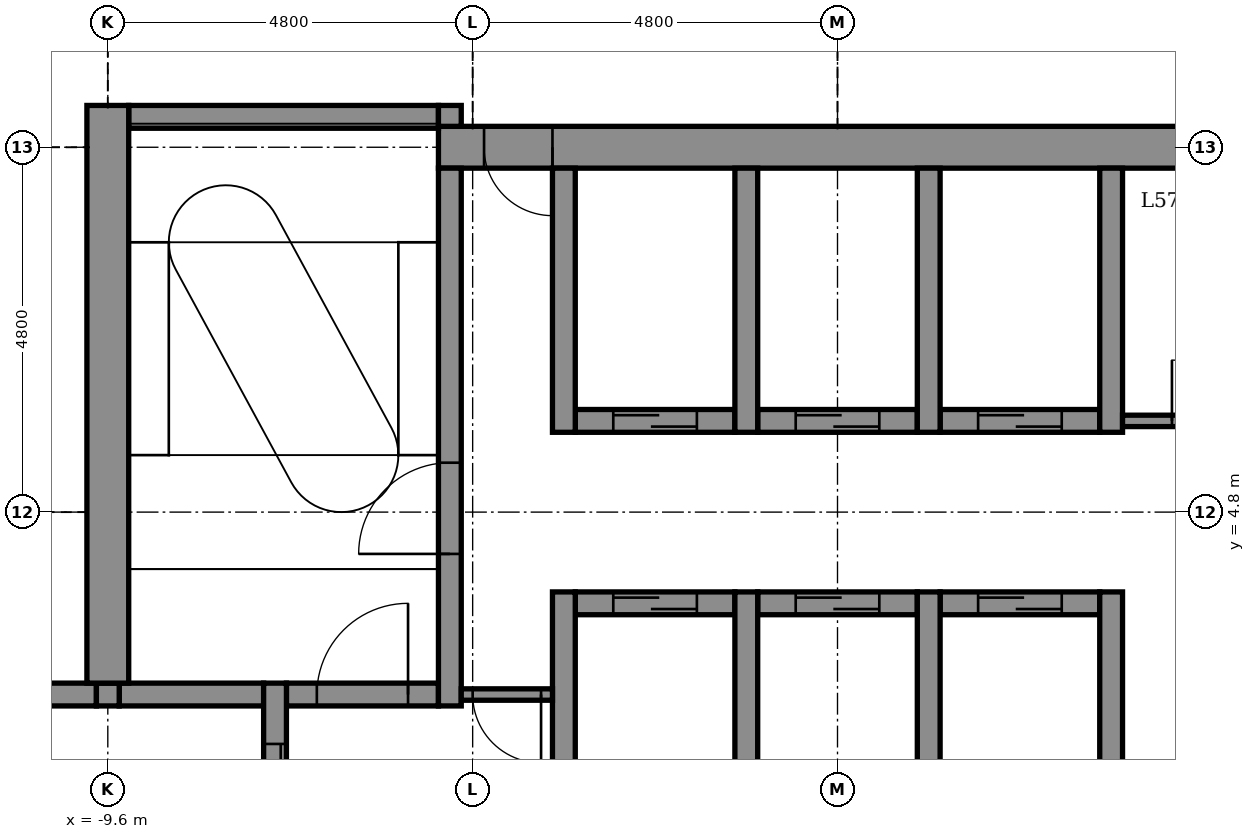
"""IFC4 building model, lengths in metres.
Left out: names, types, materials, properties, quantities, classifications, styles, units other than length and angle.
Written with IfcOpenShell. Run it as: python <this file> out.ifc"""

import sys

from ifc_helpers import new_model, si_unit, direction, frame, frame_2d, origin, place, context, subcontext, project, spatial, rectangle, extrude, element, fill, save


model = new_model("IFC4")
c1 = context("Model", 3, precision=1e-05, world=origin(), true_north=direction((0.0, 1.0)))
c2 = subcontext(c1, "Body", "Model", "MODEL_VIEW")
j1 = project(units=[si_unit("LENGTHUNIT", "METRE"), si_unit("PLANEANGLEUNIT", "RADIAN")], contexts=[c1])
p1 = place(None, origin())
s1 = spatial("IfcSite", under=j1, at=p1, CompositionType="ELEMENT")
p2 = place(p1, origin())
s2 = spatial("IfcBuilding", under=s1, at=p2, CompositionType="ELEMENT")
p3 = place(p2, frame((0.0, 0.0, 257.9)))
s3 = spatial("IfcBuildingStorey", under=s2, at=p3, CompositionType="ELEMENT", Elevation=257.9)
p4 = place(p3, frame((-10.85, 2.4, -0.15), z_axis=(0.0, 0.0, 1.0), x_axis=(1.0, 0.0, 0.0)))
e1 = element("IfcWall", 1, at=p4, inside=s3, PredefinedType="STANDARD", context=c2, shape_type="SweptSolid", body=[
    extrude(rectangle(XDim=1.1, YDim=0.3, at=frame_2d((0.55, 0.0))), origin(), (0.0, 0.0, 1.0), 3.9),
])
p5 = place(p3, frame((-9.45, 2.4, -0.15), z_axis=(0.0, 0.0, 1.0), x_axis=(1.0, 0.0, 0.0)))
e2 = element("IfcWall", 2, at=p5, inside=s3, PredefinedType="STANDARD", context=c2, shape_type="SweptSolid", body=[
    extrude(rectangle(XDim=1.9, YDim=0.3, at=frame_2d((0.95, 0.0))), origin(), (0.0, 0.0, 1.0), 3.9),
])
p6 = place(p3, frame((-7.25, 2.4, -0.15), z_axis=(0.0, 0.0, 1.0), x_axis=(1.0, 0.0, 0.0)))
e3 = element("IfcWall", 3, at=p6, inside=s3, PredefinedType="STANDARD", context=c2, shape_type="SweptSolid", body=[
    extrude(rectangle(XDim=2.0, YDim=0.3, at=frame_2d((1.0, 0.0))), origin(), (0.0, 0.0, 1.0), 3.9),
])
p7 = place(p6, frame((0.4, 0.0, 0.15)))
e4 = element("IfcOpeningElement", 4, at=p7, cuts=e3, PredefinedType="OPENING", context=c2, shape_type="SweptSolid", body=[
    extrude(rectangle(XDim=1.2, YDim=2.1, at=frame_2d((0.6, 1.05))), frame((0.0, 0.16, 0.0), z_axis=(0.0, -1.0, 0.0), x_axis=(1.0, 0.0, 0.0)), (0.0, 0.0, 1.0), 0.32),
])
p8 = place(p3, frame((-3.45, 3.6, -0.15), z_axis=(0.0, 0.0, 1.0), x_axis=(1.0, 0.0, 0.0)))
e5 = element("IfcWall", 5, at=p8, inside=s3, PredefinedType="STANDARD", context=c2, shape_type="SweptSolid", body=[
    extrude(rectangle(XDim=2.1, YDim=0.3, at=frame_2d((1.05, 0.0))), origin(), (0.0, 0.0, 1.0), 3.9),
])
p9 = place(p8, frame((0.5, 0.0, 0.15)))
e6 = element("IfcOpeningElement", 6, at=p9, cuts=e5, PredefinedType="OPENING", context=c2, shape_type="SweptSolid", body=[
    extrude(rectangle(XDim=1.1, YDim=2.1, at=frame_2d((0.55, 1.05))), frame((0.0, 0.16, 0.0), z_axis=(0.0, -1.0, 0.0), x_axis=(1.0, 0.0, 0.0)), (0.0, 0.0, 1.0), 0.32),
])
p10 = place(p3, frame((-1.05, 3.6, -0.15), z_axis=(0.0, 0.0, 1.0), x_axis=(1.0, 0.0, 0.0)))
e7 = element("IfcWall", 7, at=p10, inside=s3, PredefinedType="STANDARD", context=c2, shape_type="SweptSolid", body=[
    extrude(rectangle(XDim=2.1, YDim=0.3, at=frame_2d((1.05, 0.0))), origin(), (0.0, 0.0, 1.0), 3.9),
])
p11 = place(p10, frame((0.5, 0.0, 0.15)))
e8 = element("IfcOpeningElement", 8, at=p11, cuts=e7, PredefinedType="OPENING", context=c2, shape_type="SweptSolid", body=[
    extrude(rectangle(XDim=1.1, YDim=2.1, at=frame_2d((0.55, 1.05))), frame((0.0, 0.16, 0.0), z_axis=(0.0, -1.0, 0.0), x_axis=(1.0, 0.0, 0.0)), (0.0, 0.0, 1.0), 0.32),
])
p12 = place(p3, frame((1.35, 3.6, -0.15), z_axis=(0.0, 0.0, 1.0), x_axis=(1.0, 0.0, 0.0)))
e9 = element("IfcWall", 9, at=p12, inside=s3, PredefinedType="STANDARD", context=c2, shape_type="SweptSolid", body=[
    extrude(rectangle(XDim=2.1, YDim=0.3, at=frame_2d((1.05, 0.0))), origin(), (0.0, 0.0, 1.0), 3.9),
])
p13 = place(p12, frame((0.5, 0.0, 0.15)))
e10 = element("IfcOpeningElement", 10, at=p13, cuts=e9, PredefinedType="OPENING", context=c2, shape_type="SweptSolid", body=[
    extrude(rectangle(XDim=1.1, YDim=2.1, at=frame_2d((0.55, 1.05))), frame((0.0, 0.16, 0.0), z_axis=(0.0, -1.0, 0.0), x_axis=(1.0, 0.0, 0.0)), (0.0, 0.0, 1.0), 0.32),
])
p14 = place(p3, frame((-3.45, 6.0, -0.15), z_axis=(0.0, 0.0, 1.0), x_axis=(1.0, 0.0, 0.0)))
e11 = element("IfcWall", 11, at=p14, inside=s3, PredefinedType="STANDARD", context=c2, shape_type="SweptSolid", body=[
    extrude(rectangle(XDim=2.1, YDim=0.3, at=frame_2d((1.05, 0.0))), origin(), (0.0, 0.0, 1.0), 3.9),
])
p15 = place(p14, frame((0.5, 0.0, 0.15)))
e12 = element("IfcOpeningElement", 12, at=p15, cuts=e11, PredefinedType="OPENING", context=c2, shape_type="SweptSolid", body=[
    extrude(rectangle(XDim=1.1, YDim=2.1, at=frame_2d((0.55, 1.05))), frame((0.0, 0.16, 0.0), z_axis=(0.0, -1.0, 0.0), x_axis=(1.0, 0.0, 0.0)), (0.0, 0.0, 1.0), 0.32),
])
p16 = place(p3, frame((-1.05, 6.0, -0.15), z_axis=(0.0, 0.0, 1.0), x_axis=(1.0, 0.0, 0.0)))
e13 = element("IfcWall", 13, at=p16, inside=s3, PredefinedType="STANDARD", context=c2, shape_type="SweptSolid", body=[
    extrude(rectangle(XDim=2.1, YDim=0.3, at=frame_2d((1.05, 0.0))), origin(), (0.0, 0.0, 1.0), 3.9),
])
p17 = place(p16, frame((0.5, 0.0, 0.15)))
e14 = element("IfcOpeningElement", 14, at=p17, cuts=e13, PredefinedType="OPENING", context=c2, shape_type="SweptSolid", body=[
    extrude(rectangle(XDim=1.1, YDim=2.1, at=frame_2d((0.55, 1.05))), frame((0.0, 0.16, 0.0), z_axis=(0.0, -1.0, 0.0), x_axis=(1.0, 0.0, 0.0)), (0.0, 0.0, 1.0), 0.32),
])
p18 = place(p3, frame((1.35, 6.0, -0.15), z_axis=(0.0, 0.0, 1.0), x_axis=(1.0, 0.0, 0.0)))
e15 = element("IfcWall", 15, at=p18, inside=s3, PredefinedType="STANDARD", context=c2, shape_type="SweptSolid", body=[
    extrude(rectangle(XDim=2.1, YDim=0.3, at=frame_2d((1.05, 0.0))), origin(), (0.0, 0.0, 1.0), 3.9),
])
p19 = place(p18, frame((0.5, 0.0, 0.15)))
e16 = element("IfcOpeningElement", 16, at=p19, cuts=e15, PredefinedType="OPENING", context=c2, shape_type="SweptSolid", body=[
    extrude(rectangle(XDim=1.1, YDim=2.1, at=frame_2d((0.55, 1.05))), frame((0.0, 0.16, 0.0), z_axis=(0.0, -1.0, 0.0), x_axis=(1.0, 0.0, 0.0)), (0.0, 0.0, 1.0), 0.32),
])
p20 = place(p3, frame((-5.25, 9.6, -0.15), z_axis=(0.0, 0.0, 1.0), x_axis=(1.0, 0.0, 0.0)))
e17 = element("IfcWall", 17, at=p20, inside=s3, PredefinedType="SHEAR", context=c2, shape_type="SweptSolid", body=[
    extrude(rectangle(XDim=14.575, YDim=0.55, at=frame_2d((7.288, 0.0))), origin(), (0.0, 0.0, 1.0), 3.9),
])
p21 = place(p20, frame((0.6, 0.0, 0.15)))
e18 = element("IfcOpeningElement", 18, at=p21, cuts=e17, PredefinedType="OPENING", context=c2, shape_type="SweptSolid", body=[
    extrude(rectangle(XDim=0.9, YDim=2.1, at=frame_2d((0.45, 1.05))), frame((0.0, 0.285, 0.0), z_axis=(0.0, -1.0, 0.0), x_axis=(1.0, 0.0, 0.0)), (0.0, 0.0, 1.0), 0.57),
])
p22 = place(p3, frame((-9.325, 10.0, -0.15), z_axis=(0.0, 0.0, 1.0), x_axis=(1.0, 0.0, 0.0)))
e19 = element("IfcWall", 19, at=p22, inside=s3, PredefinedType="STANDARD", context=c2, shape_type="SweptSolid", body=[
    extrude(rectangle(XDim=4.075, YDim=0.3, at=frame_2d((2.038, 0.0))), origin(), (0.0, 0.0, 1.0), 3.9),
])
p23 = place(p3, frame((-9.6, 2.25, -0.15), z_axis=(0.0, 0.0, 1.0), x_axis=(0.0, 1.0, 0.0)))
e20 = element("IfcWall", 20, at=p23, inside=s3, PredefinedType="STANDARD", context=c2, shape_type="SweptSolid", body=[
    extrude(rectangle(XDim=0.3, YDim=0.3, at=frame_2d((0.15, 0.0))), origin(), (0.0, 0.0, 1.0), 3.9),
])
p24 = place(p3, frame((-9.6, 2.55, -0.15), z_axis=(0.0, 0.0, 1.0), x_axis=(0.0, 1.0, 0.0)))
e21 = element("IfcWall", 21, at=p24, inside=s3, PredefinedType="SHEAR", context=c2, shape_type="SweptSolid", body=[
    extrude(rectangle(XDim=7.6, YDim=0.55, at=frame_2d((3.8, 0.0))), origin(), (0.0, 0.0, 1.0), 3.9),
])
p25 = place(p3, frame((-7.4, -2.55, -0.15), z_axis=(0.0, 0.0, 1.0), x_axis=(0.0, 1.0, 0.0)))
e22 = element("IfcWall", 22, at=p25, inside=s3, PredefinedType="STANDARD", context=c2, shape_type="SweptSolid", body=[
    extrude(rectangle(XDim=5.1, YDim=0.3, at=frame_2d((2.55, 0.0))), origin(), (0.0, 0.0, 1.0), 3.9),
])
p26 = place(p25, frame((0.8, 0.0, 0.15)))
e23 = element("IfcOpeningElement", 23, at=p26, cuts=e22, PredefinedType="OPENING", context=c2, shape_type="SweptSolid", body=[
    extrude(rectangle(XDim=1.1, YDim=2.1, at=frame_2d((0.55, 1.05))), frame((0.0, 0.16, 0.0), z_axis=(0.0, -1.0, 0.0), x_axis=(1.0, 0.0, 0.0)), (0.0, 0.0, 1.0), 0.32),
])
p27 = place(p25, frame((3.2, 0.0, 0.15)))
e24 = element("IfcOpeningElement", 24, at=p27, cuts=e22, PredefinedType="OPENING", context=c2, shape_type="SweptSolid", body=[
    extrude(rectangle(XDim=1.1, YDim=2.1, at=frame_2d((0.55, 1.05))), frame((0.0, 0.16, 0.0), z_axis=(0.0, -1.0, 0.0), x_axis=(1.0, 0.0, 0.0)), (0.0, 0.0, 1.0), 0.32),
])
p28 = place(p3, frame((-5.1, 2.25, -0.15), z_axis=(0.0, 0.0, 1.0), x_axis=(0.0, 1.0, 0.0)))
e25 = element("IfcWall", 25, at=p28, inside=s3, PredefinedType="STANDARD", context=c2, shape_type="SweptSolid", body=[
    extrude(rectangle(XDim=7.075, YDim=0.3, at=frame_2d((3.538, 0.0))), origin(), (0.0, 0.0, 1.0), 3.9),
])
p29 = place(p28, frame((2.0, 0.0, 0.15)))
e26 = element("IfcOpeningElement", 26, at=p29, cuts=e25, PredefinedType="OPENING", context=c2, shape_type="SweptSolid", body=[
    extrude(rectangle(XDim=1.2, YDim=2.1, at=frame_2d((0.6, 1.05))), frame((0.0, 0.16, 0.0), z_axis=(0.0, -1.0, 0.0), x_axis=(1.0, 0.0, 0.0)), (0.0, 0.0, 1.0), 0.32),
])
p30 = place(p3, frame((-5.1, 9.875, -0.15), z_axis=(0.0, 0.0, 1.0), x_axis=(0.0, 1.0, 0.0)))
e27 = element("IfcWall", 27, at=p30, inside=s3, PredefinedType="STANDARD", context=c2, shape_type="SweptSolid", body=[
    extrude(rectangle(XDim=0.275, YDim=0.3, at=frame_2d((0.137, 0.0))), origin(), (0.0, 0.0, 1.0), 3.9),
])
p31 = place(p3, frame((-3.6, -3.75, -0.15), z_axis=(0.0, 0.0, 1.0), x_axis=(0.0, 1.0, 0.0)))
e28 = element("IfcWall", 28, at=p31, inside=s3, PredefinedType="STANDARD", context=c2, shape_type="SweptSolid", body=[
    extrude(rectangle(XDim=7.5, YDim=0.3, at=frame_2d((3.75, 0.0))), origin(), (0.0, 0.0, 1.0), 3.9),
])
p32 = place(p3, frame((-3.6, 5.85, -0.15), z_axis=(0.0, 0.0, 1.0), x_axis=(0.0, 1.0, 0.0)))
e29 = element("IfcWall", 29, at=p32, inside=s3, PredefinedType="STANDARD", context=c2, shape_type="SweptSolid", body=[
    extrude(rectangle(XDim=3.475, YDim=0.3, at=frame_2d((1.737, 0.0))), origin(), (0.0, 0.0, 1.0), 3.9),
])
p33 = place(p3, frame((-1.2, -3.75, -0.15), z_axis=(0.0, 0.0, 1.0), x_axis=(0.0, 1.0, 0.0)))
e30 = element("IfcWall", 30, at=p33, inside=s3, PredefinedType="STANDARD", context=c2, shape_type="SweptSolid", body=[
    extrude(rectangle(XDim=7.5, YDim=0.3, at=frame_2d((3.75, 0.0))), origin(), (0.0, 0.0, 1.0), 3.9),
])
p34 = place(p3, frame((-1.2, 5.85, -0.15), z_axis=(0.0, 0.0, 1.0), x_axis=(0.0, 1.0, 0.0)))
e31 = element("IfcWall", 31, at=p34, inside=s3, PredefinedType="STANDARD", context=c2, shape_type="SweptSolid", body=[
    extrude(rectangle(XDim=3.475, YDim=0.3, at=frame_2d((1.737, 0.0))), origin(), (0.0, 0.0, 1.0), 3.9),
])
p35 = place(p3, frame((1.2, -3.75, -0.15), z_axis=(0.0, 0.0, 1.0), x_axis=(0.0, 1.0, 0.0)))
e32 = element("IfcWall", 32, at=p35, inside=s3, PredefinedType="STANDARD", context=c2, shape_type="SweptSolid", body=[
    extrude(rectangle(XDim=7.5, YDim=0.3, at=frame_2d((3.75, 0.0))), origin(), (0.0, 0.0, 1.0), 3.9),
])
p36 = place(p3, frame((1.2, 5.85, -0.15), z_axis=(0.0, 0.0, 1.0), x_axis=(0.0, 1.0, 0.0)))
e33 = element("IfcWall", 33, at=p36, inside=s3, PredefinedType="STANDARD", context=c2, shape_type="SweptSolid", body=[
    extrude(rectangle(XDim=3.475, YDim=0.3, at=frame_2d((1.737, 0.0))), origin(), (0.0, 0.0, 1.0), 3.9),
])
p37 = place(p3, frame((3.6, -3.75, -0.15), z_axis=(0.0, 0.0, 1.0), x_axis=(0.0, 1.0, 0.0)))
e34 = element("IfcWall", 34, at=p37, inside=s3, PredefinedType="STANDARD", context=c2, shape_type="SweptSolid", body=[
    extrude(rectangle(XDim=7.5, YDim=0.3, at=frame_2d((3.75, 0.0))), origin(), (0.0, 0.0, 1.0), 3.9),
])
p38 = place(p3, frame((3.6, 5.85, -0.15), z_axis=(0.0, 0.0, 1.0), x_axis=(0.0, 1.0, 0.0)))
e35 = element("IfcWall", 35, at=p38, inside=s3, PredefinedType="STANDARD", context=c2, shape_type="SweptSolid", body=[
    extrude(rectangle(XDim=3.475, YDim=0.3, at=frame_2d((1.737, 0.0))), origin(), (0.0, 0.0, 1.0), 3.9),
])
p39 = place(p3, frame((3.75, 6.0, 0.0), z_axis=(0.0, 0.0, 1.0), x_axis=(1.0, 0.0, 0.0)))
e36 = element("IfcWall", 36, at=p39, inside=s3, PredefinedType="PARTITIONING", context=c2, shape_type="SweptSolid", body=[
    extrude(rectangle(XDim=2.25, YDim=0.15, at=frame_2d((1.125, 0.0))), origin(), (0.0, 0.0, 1.0), 3.75),
])
p40 = place(p39, frame((0.65, 0.0, 0.0)))
e37 = element("IfcOpeningElement", 37, at=p40, cuts=e36, PredefinedType="OPENING", context=c2, shape_type="SweptSolid", body=[
    extrude(rectangle(XDim=0.8, YDim=2.1, at=frame_2d((0.4, 1.05))), frame((0.0, 0.085, 0.0), z_axis=(0.0, -1.0, 0.0), x_axis=(1.0, 0.0, 0.0)), (0.0, 0.0, 1.0), 0.17),
])
p41 = place(p3, frame((-4.95, 2.4, 0.0), z_axis=(0.0, 0.0, 1.0), x_axis=(1.0, 0.0, 0.0)))
e38 = element("IfcWall", 38, at=p41, inside=s3, PredefinedType="PARTITIONING", context=c2, shape_type="SweptSolid", body=[
    extrude(rectangle(XDim=1.2, YDim=0.15, at=frame_2d((0.6, 0.0))), origin(), (0.0, 0.0, 1.0), 3.75),
])
p42 = place(p41, frame((0.15, 0.0, 0.0)))
e39 = element("IfcOpeningElement", 39, at=p42, cuts=e38, PredefinedType="OPENING", context=c2, shape_type="SweptSolid", body=[
    extrude(rectangle(XDim=0.9, YDim=2.1, at=frame_2d((0.45, 1.05))), frame((0.0, 0.085, 0.0), z_axis=(0.0, -1.0, 0.0), x_axis=(1.0, 0.0, 0.0)), (0.0, 0.0, 1.0), 0.17),
])
p43 = place(p40, origin())
e40 = element("IfcDoor", 40, at=p43, inside=s3, OperationType="SINGLE_SWING_LEFT", PredefinedType="DOOR", context=c2, shape_type="SweptSolid", body=[
    extrude(rectangle(XDim=0.8, YDim=2.1, at=frame_2d((0.4, 1.05))), frame((0.0, 0.025, 0.0), z_axis=(0.0, -1.0, 0.0), x_axis=(1.0, 0.0, 0.0)), (0.0, 0.0, 1.0), 0.05),
])
fill(e37, e40)
p44 = place(p27, origin())
e41 = element("IfcDoor", 41, at=p44, inside=s3, OperationType="DOUBLE_DOOR_SLIDING", PredefinedType="DOOR", context=c2, shape_type="SweptSolid", body=[
    extrude(rectangle(XDim=1.1, YDim=2.1, at=frame_2d((0.55, 1.05))), frame((0.0, 0.025, 0.0), z_axis=(0.0, -1.0, 0.0), x_axis=(1.0, 0.0, 0.0)), (0.0, 0.0, 1.0), 0.05),
])
fill(e24, e41)
p45 = place(p15, origin())
e42 = element("IfcDoor", 42, at=p45, inside=s3, OperationType="DOUBLE_DOOR_SLIDING", PredefinedType="DOOR", context=c2, shape_type="SweptSolid", body=[
    extrude(rectangle(XDim=1.1, YDim=2.1, at=frame_2d((0.55, 1.05))), frame((0.0, 0.025, 0.0), z_axis=(0.0, -1.0, 0.0), x_axis=(1.0, 0.0, 0.0)), (0.0, 0.0, 1.0), 0.05),
])
fill(e12, e42)
p46 = place(p17, origin())
e43 = element("IfcDoor", 43, at=p46, inside=s3, OperationType="DOUBLE_DOOR_SLIDING", PredefinedType="DOOR", context=c2, shape_type="SweptSolid", body=[
    extrude(rectangle(XDim=1.1, YDim=2.1, at=frame_2d((0.55, 1.05))), frame((0.0, 0.025, 0.0), z_axis=(0.0, -1.0, 0.0), x_axis=(1.0, 0.0, 0.0)), (0.0, 0.0, 1.0), 0.05),
])
fill(e14, e43)
p47 = place(p19, origin())
e44 = element("IfcDoor", 44, at=p47, inside=s3, OperationType="DOUBLE_DOOR_SLIDING", PredefinedType="DOOR", context=c2, shape_type="SweptSolid", body=[
    extrude(rectangle(XDim=1.1, YDim=2.1, at=frame_2d((0.55, 1.05))), frame((0.0, 0.025, 0.0), z_axis=(0.0, -1.0, 0.0), x_axis=(1.0, 0.0, 0.0)), (0.0, 0.0, 1.0), 0.05),
])
fill(e16, e44)
p48 = place(p9, origin())
e45 = element("IfcDoor", 45, at=p48, inside=s3, OperationType="DOUBLE_DOOR_SLIDING", PredefinedType="DOOR", context=c2, shape_type="SweptSolid", body=[
    extrude(rectangle(XDim=1.1, YDim=2.1, at=frame_2d((0.55, 1.05))), frame((0.0, 0.025, 0.0), z_axis=(0.0, -1.0, 0.0), x_axis=(1.0, 0.0, 0.0)), (0.0, 0.0, 1.0), 0.05),
])
fill(e6, e45)
p49 = place(p11, origin())
e46 = element("IfcDoor", 46, at=p49, inside=s3, OperationType="DOUBLE_DOOR_SLIDING", PredefinedType="DOOR", context=c2, shape_type="SweptSolid", body=[
    extrude(rectangle(XDim=1.1, YDim=2.1, at=frame_2d((0.55, 1.05))), frame((0.0, 0.025, 0.0), z_axis=(0.0, -1.0, 0.0), x_axis=(1.0, 0.0, 0.0)), (0.0, 0.0, 1.0), 0.05),
])
fill(e8, e46)
p50 = place(p13, origin())
e47 = element("IfcDoor", 47, at=p50, inside=s3, OperationType="DOUBLE_DOOR_SLIDING", PredefinedType="DOOR", context=c2, shape_type="SweptSolid", body=[
    extrude(rectangle(XDim=1.1, YDim=2.1, at=frame_2d((0.55, 1.05))), frame((0.0, 0.025, 0.0), z_axis=(0.0, -1.0, 0.0), x_axis=(1.0, 0.0, 0.0)), (0.0, 0.0, 1.0), 0.05),
])
fill(e10, e47)
p51 = place(p29, origin())
e48 = element("IfcDoor", 48, at=p51, inside=s3, OperationType="SINGLE_SWING_LEFT", PredefinedType="DOOR", context=c2, shape_type="SweptSolid", body=[
    extrude(rectangle(XDim=1.2, YDim=2.1, at=frame_2d((0.6, 1.05))), frame((0.0, 0.025, 0.0), z_axis=(0.0, -1.0, 0.0), x_axis=(1.0, 0.0, 0.0)), (0.0, 0.0, 1.0), 0.05),
])
fill(e26, e48)
p52 = place(p21, frame((0.9, 0.0, 0.0), z_axis=(0.0, 0.0, 1.0), x_axis=(-1.0, 0.0, 0.0)))
e49 = element("IfcDoor", 49, at=p52, inside=s3, OperationType="SINGLE_SWING_RIGHT", PredefinedType="DOOR", context=c2, shape_type="SweptSolid", body=[
    extrude(rectangle(XDim=0.9, YDim=2.1, at=frame_2d((0.45, 1.05))), frame((0.0, 0.025, 0.0), z_axis=(0.0, -1.0, 0.0), x_axis=(1.0, 0.0, 0.0)), (0.0, 0.0, 1.0), 0.05),
])
fill(e18, e49)
p53 = place(p42, frame((0.9, 0.0, 0.0), z_axis=(0.0, 0.0, 1.0), x_axis=(-1.0, 0.0, 0.0)))
e50 = element("IfcDoor", 50, at=p53, inside=s3, OperationType="SINGLE_SWING_RIGHT", PredefinedType="DOOR", context=c2, shape_type="SweptSolid", body=[
    extrude(rectangle(XDim=0.9, YDim=2.1, at=frame_2d((0.45, 1.05))), frame((0.0, 0.025, 0.0), z_axis=(0.0, -1.0, 0.0), x_axis=(1.0, 0.0, 0.0)), (0.0, 0.0, 1.0), 0.05),
])
fill(e39, e50)
p54 = place(p7, origin())
e51 = element("IfcDoor", 51, at=p54, inside=s3, OperationType="SINGLE_SWING_RIGHT", PredefinedType="DOOR", context=c2, shape_type="SweptSolid", body=[
    extrude(rectangle(XDim=1.2, YDim=2.1, at=frame_2d((0.6, 1.05))), frame((0.0, 0.025, 0.0), z_axis=(0.0, -1.0, 0.0), x_axis=(1.0, 0.0, 0.0)), (0.0, 0.0, 1.0), 0.05),
])
fill(e4, e51)
save(model, sys.argv[1])
